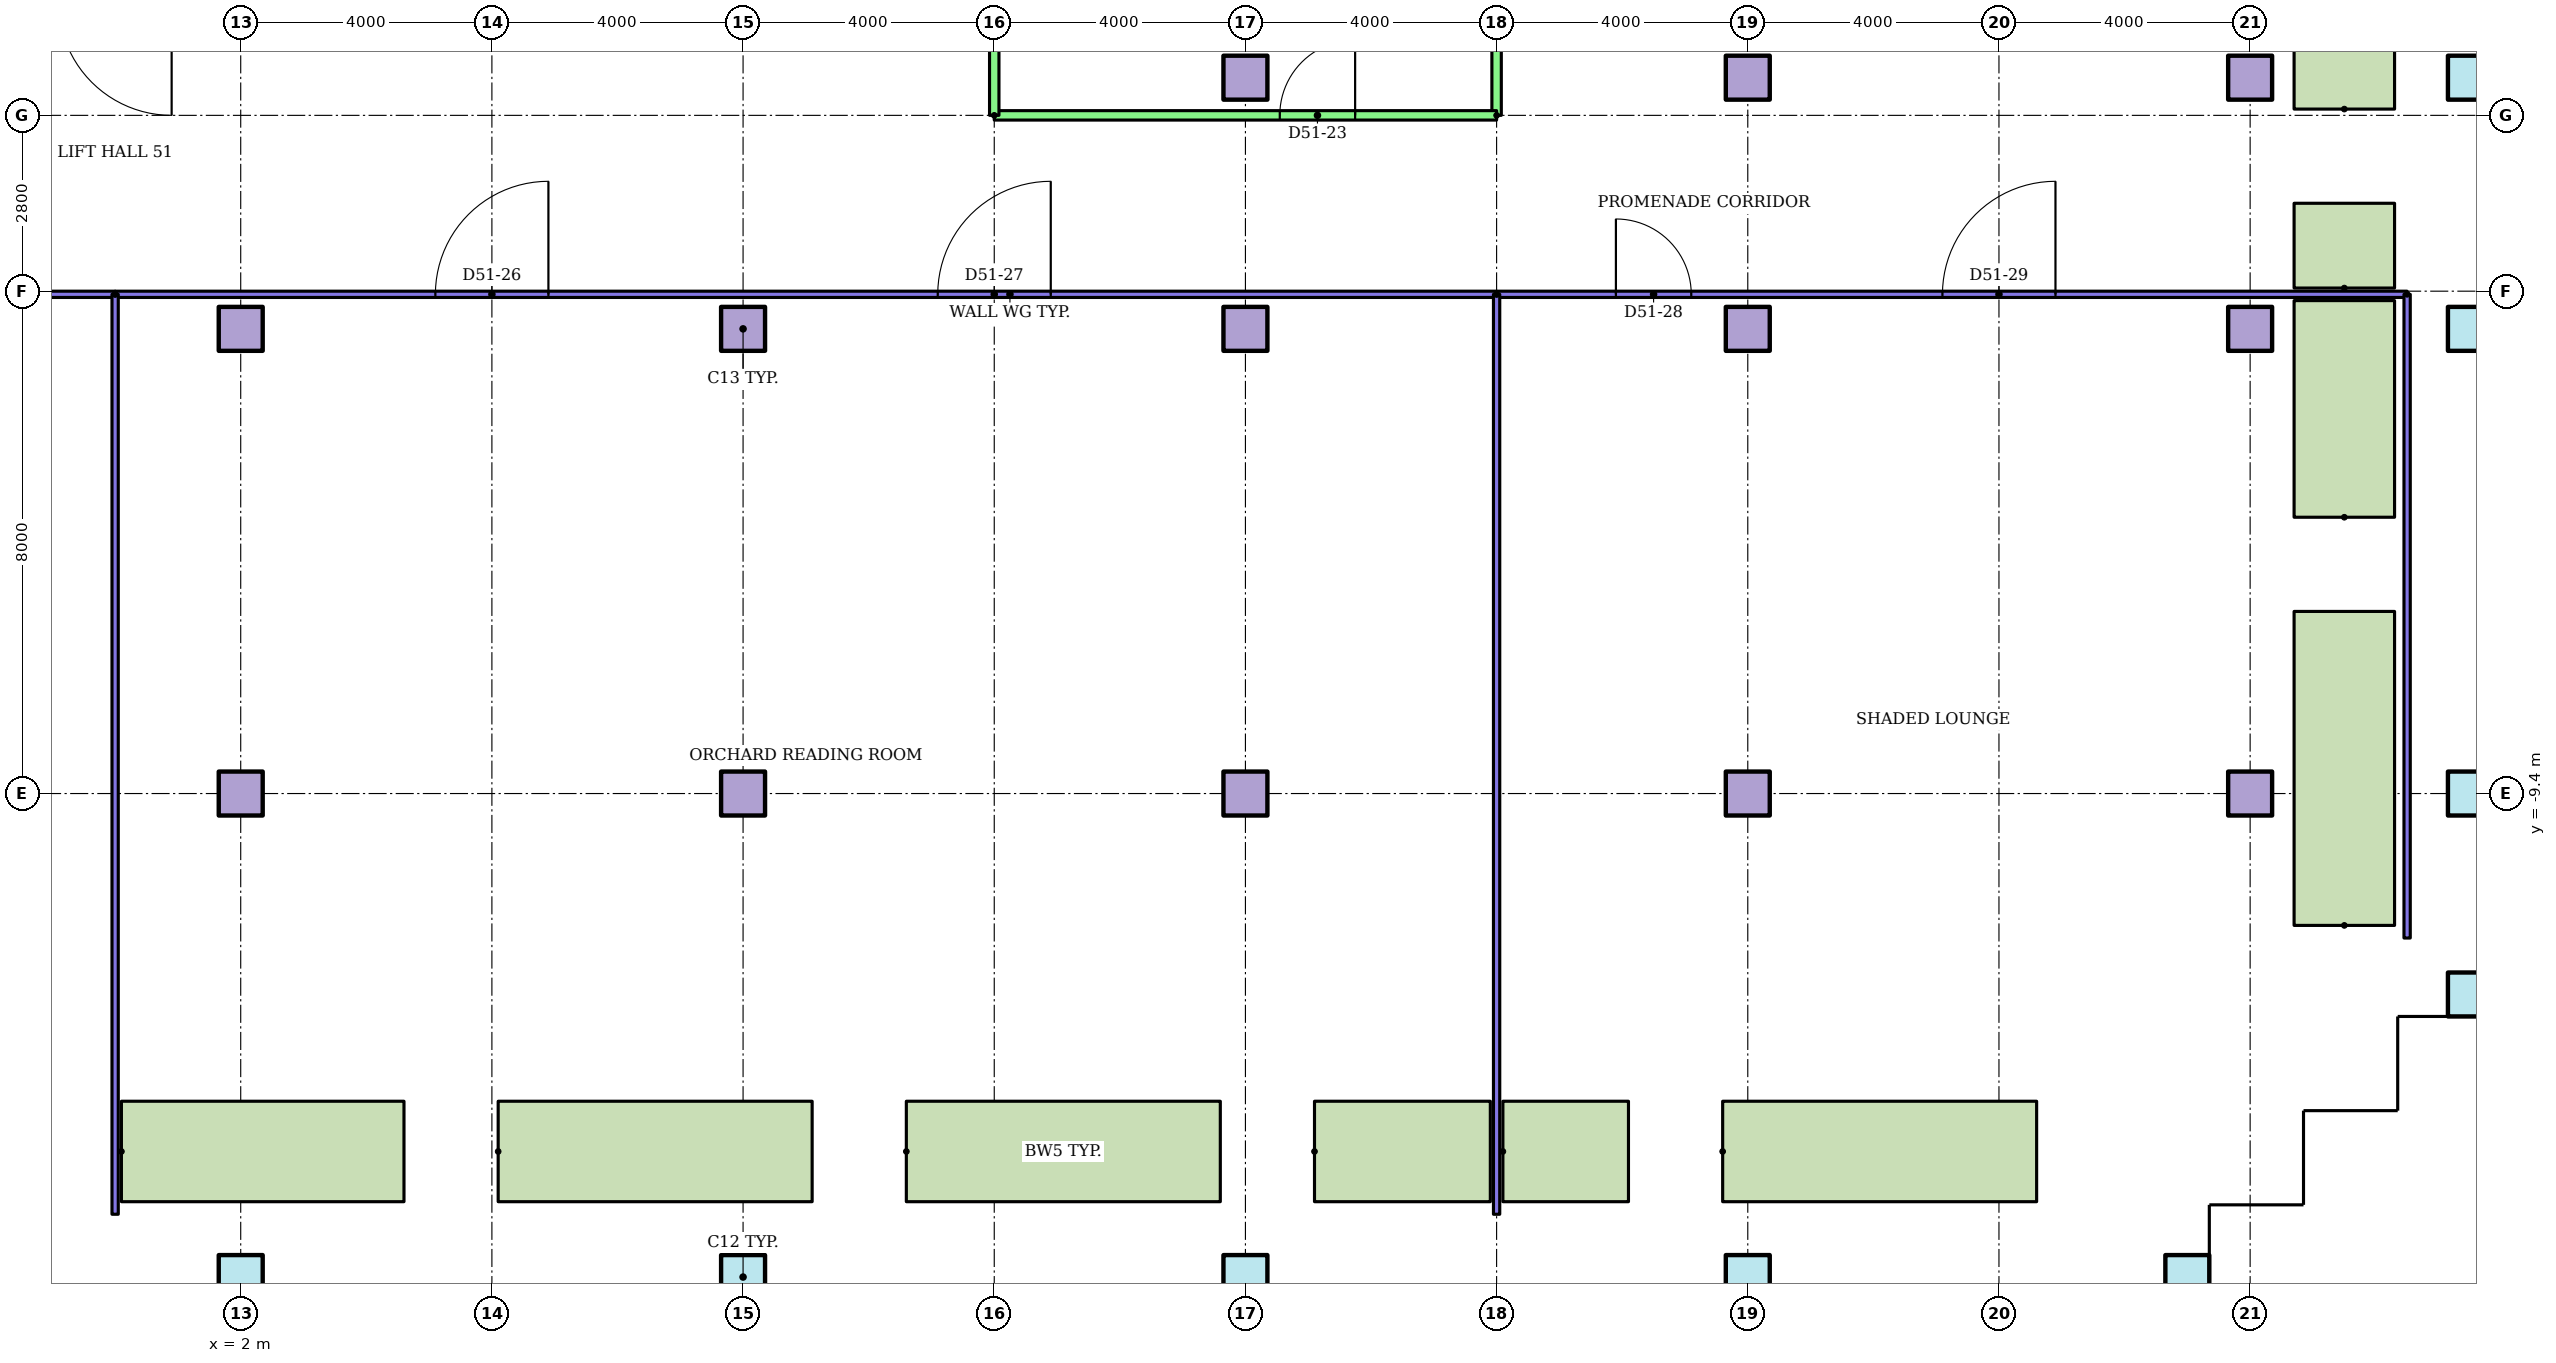
"""IFC4 building model, lengths in metres.
Left out: names, types, materials, properties, quantities, classifications, styles, units other than length and angle.
Written with IfcOpenShell. Run it as: python <this file> out.ifc"""

import sys

from ifc_helpers import new_model, si_unit, direction, frame, frame_2d, origin, origin_2d, place, context, subcontext, project, spatial, rectangle, hollow_rectangle, extrude, element, fill, save


model = new_model("IFC4")
c1 = context("Model", 3, precision=1e-05, world=origin(), true_north=direction((0.0, 1.0)))
c2 = subcontext(c1, "Body", "Model", "MODEL_VIEW")
j1 = project(units=[si_unit("LENGTHUNIT", "METRE"), si_unit("PLANEANGLEUNIT", "RADIAN")], contexts=[c1])
p1 = place(None, origin())
s1 = spatial("IfcSite", under=j1, at=p1, CompositionType="ELEMENT")
p2 = place(p1, origin())
s2 = spatial("IfcBuilding", under=s1, at=p2, CompositionType="ELEMENT")
p3 = place(p2, frame((0.0, 0.0, 194.1)))
s3 = spatial("IfcBuildingStorey", under=s2, at=p3, CompositionType="ELEMENT", Elevation=194.1)
for number, where in (
    (1, (2.0, -17.1, 0.0)),
    (2, (10.0, -17.1, 0.0)),
    (3, (18.0, -17.1, 0.0)),
):
    element("IfcColumn", number, at=place(p3, frame(where)), inside=s3, PredefinedType="COLUMN", context=c2, shape_type="SweptSolid", body=[
        extrude(hollow_rectangle(XDim=0.7, YDim=0.7, WallThickness=0.036, at=origin_2d()), origin(), (0.0, 0.0, 1.0), 9.6),
    ])
p4 = place(p3, frame((26.0, -17.1, 0.0)))
e4 = element("IfcColumn", 4, at=p4, inside=s3, PredefinedType="COLUMN", context=c2, shape_type="SweptSolid", body=[
    extrude(hollow_rectangle(XDim=0.7, YDim=0.7, WallThickness=0.036, at=origin_2d()), origin(), (0.0, 0.0, 1.0), 8.8),
])
for number, where in (
    (5, (33.0, -17.1, 0.0)),
    (6, (37.5, -12.6, 0.0)),
):
    element("IfcColumn", number, at=place(p3, frame(where)), inside=s3, PredefinedType="COLUMN", context=c2, shape_type="SweptSolid", body=[
        extrude(hollow_rectangle(XDim=0.7, YDim=0.7, WallThickness=0.036, at=origin_2d()), origin(), (0.0, 0.0, 1.0), 9.25),
    ])
for number, where in (
    (7, (2.0, -9.4, 0.0)),
    (8, (10.0, -9.4, 0.0)),
    (9, (18.0, -9.4, 0.0)),
    (10, (26.0, -9.4, 0.0)),
):
    element("IfcColumn", number, at=place(p3, frame(where)), inside=s3, PredefinedType="COLUMN", context=c2, shape_type="SweptSolid", body=[
        extrude(rectangle(XDim=0.7, YDim=0.7, at=origin_2d()), origin(), (0.0, 0.0, 1.0), 9.6),
    ])
p5 = place(p3, frame((34.0, -9.4, 0.0)))
e11 = element("IfcColumn", 11, at=p5, inside=s3, PredefinedType="COLUMN", context=c2, shape_type="SweptSolid", body=[
    extrude(rectangle(XDim=0.7, YDim=0.7, at=origin_2d()), origin(), (0.0, 0.0, 1.0), 8.8),
])
p6 = place(p3, frame((37.5, -9.4, 0.0)))
e12 = element("IfcColumn", 12, at=p6, inside=s3, PredefinedType="COLUMN", context=c2, shape_type="SweptSolid", body=[
    extrude(hollow_rectangle(XDim=0.7, YDim=0.7, WallThickness=0.036, at=origin_2d()), origin(), (0.0, 0.0, 1.0), 9.25),
])
for number, where in (
    (13, (2.0, -2.0, 0.0)),
    (14, (10.0, -2.0, 0.0)),
    (15, (18.0, -2.0, 0.0)),
    (16, (26.0, -2.0, 0.0)),
):
    element("IfcColumn", number, at=place(p3, frame(where)), inside=s3, PredefinedType="COLUMN", context=c2, shape_type="SweptSolid", body=[
        extrude(rectangle(XDim=0.7, YDim=0.7, at=origin_2d()), origin(), (0.0, 0.0, 1.0), 9.6),
    ])
p7 = place(p3, frame((34.0, -2.0, 0.0)))
e17 = element("IfcColumn", 17, at=p7, inside=s3, PredefinedType="COLUMN", context=c2, shape_type="SweptSolid", body=[
    extrude(rectangle(XDim=0.7, YDim=0.7, at=origin_2d()), origin(), (0.0, 0.0, 1.0), 8.8),
])
p8 = place(p3, frame((37.5, -2.0, 0.0)))
e18 = element("IfcColumn", 18, at=p8, inside=s3, PredefinedType="COLUMN", context=c2, shape_type="SweptSolid", body=[
    extrude(hollow_rectangle(XDim=0.7, YDim=0.7, WallThickness=0.036, at=origin_2d()), origin(), (0.0, 0.0, 1.0), 9.25),
])
for number, where in (
    (19, (18.0, 2.0, 0.0)),
    (20, (26.0, 2.0, 0.0)),
):
    element("IfcColumn", number, at=place(p3, frame(where)), inside=s3, PredefinedType="COLUMN", context=c2, shape_type="SweptSolid", body=[
        extrude(rectangle(XDim=0.7, YDim=0.7, at=origin_2d()), origin(), (0.0, 0.0, 1.0), 9.6),
    ])
p9 = place(p3, frame((34.0, 2.0, 0.0)))
e21 = element("IfcColumn", 21, at=p9, inside=s3, PredefinedType="COLUMN", context=c2, shape_type="SweptSolid", body=[
    extrude(rectangle(XDim=0.7, YDim=0.7, at=origin_2d()), origin(), (0.0, 0.0, 1.0), 8.8),
])
p10 = place(p3, frame((37.5, 2.0, 0.0)))
e22 = element("IfcColumn", 22, at=p10, inside=s3, PredefinedType="COLUMN", context=c2, shape_type="SweptSolid", body=[
    extrude(hollow_rectangle(XDim=0.7, YDim=0.7, WallThickness=0.036, at=origin_2d()), origin(), (0.0, 0.0, 1.0), 9.25),
])
for number, where in (
    (23, (6.1, -15.1, 0.0)),
    (24, (12.6, -15.1, 0.0)),
    (25, (25.6, -15.1, 0.0)),
):
    element("IfcWall", number, at=place(p3, frame(where)), inside=s3, PredefinedType="STANDARD", context=c2, shape_type="SweptSolid", body=[
        extrude(rectangle(XDim=5.0, YDim=1.6, at=frame_2d((2.5, 0.0))), origin(), (0.0, 0.0, 1.0), 0.8),
    ])
for number, where, z_axis, x_axis in (
    (26, (35.5, -11.5, 0.0), (0.0, 0.0, 1.0), (0.0, 1.0, 0.0)),
    (27, (35.5, 1.5, 0.0), (0.0, 0.0, 1.0), (0.0, 1.0, 0.0)),
):
    element("IfcWall", number, at=place(p3, frame(where, z_axis=z_axis, x_axis=x_axis)), inside=s3, PredefinedType="STANDARD", context=c2, shape_type="SweptSolid", body=[
        extrude(rectangle(XDim=5.0, YDim=1.6, at=frame_2d((2.5, 0.0))), origin(), (0.0, 0.0, 1.0), 0.8),
    ])
p11 = place(p3, frame((22.0, 1.4, 0.0), z_axis=(0.0, 0.0, 1.0), x_axis=(0.0, 1.0, 0.0)))
e28 = element("IfcWall", 28, at=p11, inside=s3, PredefinedType="PARTITIONING", context=c2, shape_type="SweptSolid", body=[
    extrude(rectangle(XDim=9.0, YDim=0.15, at=frame_2d((4.5, 0.0))), origin(), (0.0, 0.0, 1.0), 8.8),
])
p12 = place(p3, frame((14.0, 1.4, 0.0)))
e29 = element("IfcWall", 29, at=p12, inside=s3, PredefinedType="PARTITIONING", context=c2, shape_type="SweptSolid", body=[
    extrude(rectangle(XDim=8.0, YDim=0.15, at=frame_2d((4.0, 0.0))), origin(), (0.0, 0.0, 1.0), 8.8),
])
p13 = place(p12, frame((4.547, 0.0, 0.0)))
e30 = element("IfcOpeningElement", 30, at=p13, cuts=e29, PredefinedType="OPENING", context=c2, shape_type="SweptSolid", body=[
    extrude(rectangle(XDim=1.2, YDim=2.1, at=frame_2d((0.6, 1.05))), frame((0.0, 0.085, 0.0), z_axis=(0.0, -1.0, 0.0), x_axis=(1.0, 0.0, 0.0)), (0.0, 0.0, 1.0), 0.17),
])
p14 = place(p3, frame((14.0, 3.0, 0.0), z_axis=(0.0, 0.0, 1.0), x_axis=(0.0, -1.0, 0.0)))
e31 = element("IfcWall", 31, at=p14, inside=s3, PredefinedType="PARTITIONING", context=c2, shape_type="SweptSolid", body=[
    extrude(rectangle(XDim=1.6, YDim=0.15, at=frame_2d((0.8, 0.0))), origin(), (0.0, 0.0, 1.0), 8.8),
])
p15 = place(p3, frame((-8.0, -1.45, 0.0)))
e32 = element("IfcWall", 32, at=p15, inside=s3, PredefinedType="PARTITIONING", context=c2, shape_type="SweptSolid", body=[
    extrude(rectangle(XDim=8.0, YDim=0.1, at=frame_2d((4.0, 0.0))), origin(), (0.0, 0.0, 1.0), 8.8),
])
p16 = place(p15, frame((4.1, 0.0, 0.0)))
e33 = element("IfcOpeningElement", 33, at=p16, cuts=e32, PredefinedType="OPENING", context=c2, shape_type="SweptSolid", body=[
    extrude(rectangle(XDim=1.8, YDim=2.1, at=frame_2d((0.9, 1.05))), frame((0.0, 0.06, 0.0), z_axis=(0.0, -1.0, 0.0), x_axis=(1.0, 0.0, 0.0)), (0.0, 0.0, 1.0), 0.12),
])
p17 = place(p3, frame((0.0, -1.45, 0.0)))
e34 = element("IfcWall", 34, at=p17, inside=s3, PredefinedType="PARTITIONING", context=c2, shape_type="SweptSolid", body=[
    extrude(rectangle(XDim=22.0, YDim=0.1, at=frame_2d((11.0, 0.0))), origin(), (0.0, 0.0, 1.0), 8.8),
])
p18 = place(p17, frame((5.1, 0.0, 0.0)))
e35 = element("IfcOpeningElement", 35, at=p18, cuts=e34, PredefinedType="OPENING", context=c2, shape_type="SweptSolid", body=[
    extrude(rectangle(XDim=1.8, YDim=2.1, at=frame_2d((0.9, 1.05))), frame((0.0, 0.06, 0.0), z_axis=(0.0, -1.0, 0.0), x_axis=(1.0, 0.0, 0.0)), (0.0, 0.0, 1.0), 0.12),
])
p19 = place(p17, frame((13.1, 0.0, 0.0)))
e36 = element("IfcOpeningElement", 36, at=p19, cuts=e34, PredefinedType="OPENING", context=c2, shape_type="SweptSolid", body=[
    extrude(rectangle(XDim=1.8, YDim=2.1, at=frame_2d((0.9, 1.05))), frame((0.0, 0.06, 0.0), z_axis=(0.0, -1.0, 0.0), x_axis=(1.0, 0.0, 0.0)), (0.0, 0.0, 1.0), 0.12),
])
p20 = place(p3, frame((22.0, -1.45, 0.0)))
e37 = element("IfcWall", 37, at=p20, inside=s3, PredefinedType="PARTITIONING", context=c2, shape_type="SweptSolid", body=[
    extrude(rectangle(XDim=14.5, YDim=0.1, at=frame_2d((7.25, 0.0))), origin(), (0.0, 0.0, 1.0), 8.8),
])
p21 = place(p20, frame((1.9, 0.0, 0.0)))
e38 = element("IfcOpeningElement", 38, at=p21, cuts=e37, PredefinedType="OPENING", context=c2, shape_type="SweptSolid", body=[
    extrude(rectangle(XDim=1.2, YDim=2.1, at=frame_2d((0.6, 1.05))), frame((0.0, 0.06, 0.0), z_axis=(0.0, -1.0, 0.0), x_axis=(1.0, 0.0, 0.0)), (0.0, 0.0, 1.0), 0.12),
])
p22 = place(p20, frame((7.1, 0.0, 0.0)))
e39 = element("IfcOpeningElement", 39, at=p22, cuts=e37, PredefinedType="OPENING", context=c2, shape_type="SweptSolid", body=[
    extrude(rectangle(XDim=1.8, YDim=2.1, at=frame_2d((0.9, 1.05))), frame((0.0, 0.06, 0.0), z_axis=(0.0, -1.0, 0.0), x_axis=(1.0, 0.0, 0.0)), (0.0, 0.0, 1.0), 0.12),
])
for number, where, z_axis, x_axis in (
    (40, (22.0, -1.45, 0.0), (0.0, 0.0, 1.0), (0.0, -1.0, 0.0)),
    (41, (0.0, -1.45, 0.0), (0.0, 0.0, 1.0), (0.0, -1.0, 0.0)),
):
    element("IfcWall", number, at=place(p3, frame(where, z_axis=z_axis, x_axis=x_axis)), inside=s3, PredefinedType="PARTITIONING", context=c2, shape_type="SweptSolid", body=[
        extrude(rectangle(XDim=14.65, YDim=0.1, at=frame_2d((7.325, 0.0))), origin(), (0.0, 0.0, 1.0), 8.8),
    ])
p23 = place(p3, frame((36.5, -1.45, 0.0), z_axis=(0.0, 0.0, 1.0), x_axis=(0.0, -1.0, 0.0)))
e42 = element("IfcWall", 42, at=p23, inside=s3, PredefinedType="PARTITIONING", context=c2, shape_type="SweptSolid", body=[
    extrude(rectangle(XDim=10.251, YDim=0.1, at=frame_2d((5.125, 0.0))), origin(), (0.0, 0.0, 1.0), 8.8),
])
p24 = place(p3, frame((0.1, -15.1, 0.0)))
e43 = element("IfcWall", 43, at=p24, inside=s3, PredefinedType="STANDARD", context=c2, shape_type="SweptSolid", body=[
    extrude(rectangle(XDim=4.5, YDim=1.6, at=frame_2d((2.25, 0.0))), origin(), (0.0, 0.0, 1.0), 0.8),
])
p25 = place(p3, frame((19.1, -15.1, 0.0)))
e44 = element("IfcWall", 44, at=p25, inside=s3, PredefinedType="STANDARD", context=c2, shape_type="SweptSolid", body=[
    extrude(rectangle(XDim=2.8, YDim=1.6, at=frame_2d((1.4, 0.0))), origin(), (0.0, 0.0, 1.0), 0.8),
])
p26 = place(p3, frame((22.1, -15.1, 0.0)))
e45 = element("IfcWall", 45, at=p26, inside=s3, PredefinedType="STANDARD", context=c2, shape_type="SweptSolid", body=[
    extrude(rectangle(XDim=2.0, YDim=1.6, at=frame_2d((1.0, 0.0))), origin(), (0.0, 0.0, 1.0), 0.8),
])
p27 = place(p3, frame((35.5, -5.0, 0.0), z_axis=(0.0, 0.0, 1.0), x_axis=(0.0, 1.0, 0.0)))
e46 = element("IfcWall", 46, at=p27, inside=s3, PredefinedType="STANDARD", context=c2, shape_type="SweptSolid", body=[
    extrude(rectangle(XDim=3.45, YDim=1.6, at=frame_2d((1.725, 0.0))), origin(), (0.0, 0.0, 1.0), 0.8),
])
p28 = place(p3, frame((35.5, -1.35, 0.0), z_axis=(0.0, 0.0, 1.0), x_axis=(0.0, 1.0, 0.0)))
e47 = element("IfcWall", 47, at=p28, inside=s3, PredefinedType="STANDARD", context=c2, shape_type="SweptSolid", body=[
    extrude(rectangle(XDim=1.35, YDim=1.6, at=frame_2d((0.675, 0.0))), origin(), (0.0, 0.0, 1.0), 0.8),
])
p29 = place(p13, origin())
e48 = element("IfcDoor", 48, at=p29, inside=s3, OperationType="SINGLE_SWING_RIGHT", PredefinedType="DOOR", context=c2, shape_type="SweptSolid", body=[
    extrude(rectangle(XDim=1.2, YDim=2.1, at=frame_2d((0.6, 1.05))), frame((0.0, 0.025, 0.0), z_axis=(0.0, -1.0, 0.0), x_axis=(1.0, 0.0, 0.0)), (0.0, 0.0, 1.0), 0.05),
])
fill(e30, e48)
p30 = place(p18, origin())
e49 = element("IfcDoor", 49, at=p30, inside=s3, OperationType="DOUBLE_DOOR_SINGLE_SWING", PredefinedType="DOOR", context=c2, shape_type="SweptSolid", body=[
    extrude(rectangle(XDim=1.8, YDim=2.1, at=frame_2d((0.9, 1.05))), frame((0.0, 0.025, 0.0), z_axis=(0.0, -1.0, 0.0), x_axis=(1.0, 0.0, 0.0)), (0.0, 0.0, 1.0), 0.05),
])
fill(e35, e49)
p31 = place(p19, origin())
e50 = element("IfcDoor", 50, at=p31, inside=s3, OperationType="DOUBLE_DOOR_SINGLE_SWING", PredefinedType="DOOR", context=c2, shape_type="SweptSolid", body=[
    extrude(rectangle(XDim=1.8, YDim=2.1, at=frame_2d((0.9, 1.05))), frame((0.0, 0.025, 0.0), z_axis=(0.0, -1.0, 0.0), x_axis=(1.0, 0.0, 0.0)), (0.0, 0.0, 1.0), 0.05),
])
fill(e36, e50)
p32 = place(p21, origin())
e51 = element("IfcDoor", 51, at=p32, inside=s3, OperationType="SINGLE_SWING_LEFT", PredefinedType="DOOR", context=c2, shape_type="SweptSolid", body=[
    extrude(rectangle(XDim=1.2, YDim=2.1, at=frame_2d((0.6, 1.05))), frame((0.0, 0.025, 0.0), z_axis=(0.0, -1.0, 0.0), x_axis=(1.0, 0.0, 0.0)), (0.0, 0.0, 1.0), 0.05),
])
fill(e38, e51)
p33 = place(p22, origin())
e52 = element("IfcDoor", 52, at=p33, inside=s3, OperationType="DOUBLE_DOOR_SINGLE_SWING", PredefinedType="DOOR", context=c2, shape_type="SweptSolid", body=[
    extrude(rectangle(XDim=1.8, YDim=2.1, at=frame_2d((0.9, 1.05))), frame((0.0, 0.025, 0.0), z_axis=(0.0, -1.0, 0.0), x_axis=(1.0, 0.0, 0.0)), (0.0, 0.0, 1.0), 0.05),
])
fill(e39, e52)
save(model, sys.argv[1])
